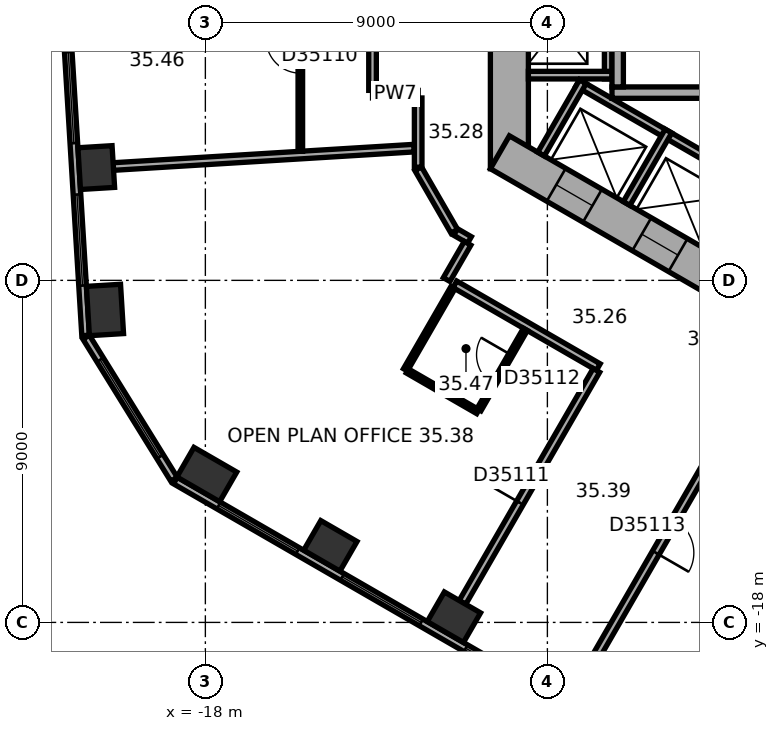
"""IFC4 building model, lengths in metres.
Left out: names, types, materials, properties, quantities, classifications, styles, units other than length and angle.
Written with IfcOpenShell. Run it as: python <this file> out.ifc"""

import sys

from ifc_helpers import new_model, si_unit, direction, frame, frame_2d, origin, origin_2d, place, context, subcontext, project, spatial, rectangle, extrude, element, fill, save


model = new_model("IFC4")
c1 = context("Model", 3, precision=1e-05, world=origin(), true_north=direction((0.0, 1.0)))
c2 = subcontext(c1, "Body", "Model", "MODEL_VIEW")
j1 = project(units=[si_unit("LENGTHUNIT", "METRE"), si_unit("PLANEANGLEUNIT", "RADIAN")], contexts=[c1])
p1 = place(None, origin())
s1 = spatial("IfcSite", under=j1, at=p1, CompositionType="ELEMENT")
p2 = place(p1, origin())
s2 = spatial("IfcBuilding", under=s1, at=p2, CompositionType="ELEMENT")
p3 = place(p2, frame((0.0, 0.0, 146.6)))
s3 = spatial("IfcBuildingStorey", under=s2, at=p3, CompositionType="ELEMENT", Elevation=146.6)
p4 = place(p3, frame((-20.871, -6.032, 0.0), z_axis=(0.0, 0.0, 1.0), x_axis=(0.061048539535, -0.998134798422, 0.0)))
e1 = element("IfcColumn", 1, at=p4, inside=s3, PredefinedType="COLUMN", context=c2, shape_type="SweptSolid", body=[
    extrude(rectangle(XDim=1.1, YDim=0.9, at=origin_2d()), origin(), (0.0, 0.0, 1.0), 3.7),
])
for number, where, z_axis, x_axis in (
    (2, (-20.642, -9.779, 0.0), (0.0, 0.0, 1.0), (0.061, -0.998, 0.0)),
    (3, (-17.962, -14.109, 0.0), (0.0, 0.0, 1.0), (0.866, -0.5, 0.0)),
):
    element("IfcColumn", number, at=place(p3, frame(where, z_axis=z_axis, x_axis=x_axis)), inside=s3, PredefinedType="COLUMN", context=c2, shape_type="SweptSolid", body=[
        extrude(rectangle(XDim=1.3, YDim=0.9, at=origin_2d()), origin(), (0.0, 0.0, 1.0), 3.7),
    ])
for number, where, z_axis, x_axis in (
    (4, (-14.711, -15.986, 0.0), (0.0, 0.0, 1.0), (0.866, -0.5, 0.0)),
    (5, (-11.46, -17.863, 0.0), (0.0, 0.0, 1.0), (0.866, -0.5, 0.0)),
):
    element("IfcColumn", number, at=place(p3, frame(where, z_axis=z_axis, x_axis=x_axis)), inside=s3, PredefinedType="COLUMN", context=c2, shape_type="SweptSolid", body=[
        extrude(rectangle(XDim=1.1, YDim=0.9, at=origin_2d()), origin(), (0.0, 0.0, 1.0), 3.7),
    ])
p5 = place(p3, frame((-10.0, 6.062, 0.0), z_axis=(0.0, 0.0, 1.0), x_axis=(0.0, -1.0, 0.0)))
e6 = element("IfcWall", 6, at=p5, inside=s3, PredefinedType="SHEAR", context=c2, shape_type="SweptSolid", body=[
    extrude(rectangle(XDim=12.125, YDim=1.0, at=frame_2d((6.062, 0.0))), origin(), (0.0, 0.0, 1.0), 3.7),
])
p6 = place(p5, frame((5.212, 0.0, 0.0)))
e7 = element("IfcOpeningElement", 7, at=p6, cuts=e6, PredefinedType="OPENING", context=c2, shape_type="SweptSolid", body=[
    extrude(rectangle(XDim=1.1, YDim=2.1, at=frame_2d((0.55, 1.05))), frame((0.0, 0.51, 0.0), z_axis=(0.0, -1.0, 0.0), x_axis=(1.0, 0.0, 0.0)), (0.0, 0.0, 1.0), 1.02),
])
p7 = place(p5, frame((7.812, 0.0, 0.0)))
e8 = element("IfcOpeningElement", 8, at=p7, cuts=e6, PredefinedType="OPENING", context=c2, shape_type="SweptSolid", body=[
    extrude(rectangle(XDim=1.1, YDim=2.1, at=frame_2d((0.55, 1.05))), frame((0.0, 0.51, 0.0), z_axis=(0.0, -1.0, 0.0), x_axis=(1.0, 0.0, 0.0)), (0.0, 0.0, 1.0), 1.02),
])
p8 = place(p3, frame((-10.25, -5.629, 0.0), z_axis=(0.0, 0.0, 1.0), x_axis=(0.866022616891, -0.50000482701, 0.0)))
e9 = element("IfcWall", 9, at=p8, inside=s3, PredefinedType="SHEAR", context=c2, shape_type="SweptSolid", body=[
    extrude(rectangle(XDim=12.125, YDim=1.0, at=frame_2d((6.062, 0.0))), origin(), (0.0, 0.0, 1.0), 3.7),
])
p9 = place(p8, frame((6.262, 0.0, 0.0)))
e10 = element("IfcOpeningElement", 10, at=p9, cuts=e9, PredefinedType="OPENING", context=c2, shape_type="SweptSolid", body=[
    extrude(rectangle(XDim=1.5, YDim=2.1, at=frame_2d((0.75, 1.05))), frame((0.0, 0.51, 0.0), z_axis=(0.0, -1.0, 0.0), x_axis=(1.0, 0.0, 0.0)), (0.0, 0.0, 1.0), 1.02),
])
p10 = place(p8, frame((1.712, 0.0, 0.0)))
e11 = element("IfcOpeningElement", 11, at=p10, cuts=e9, PredefinedType="OPENING", context=c2, shape_type="SweptSolid", body=[
    extrude(rectangle(XDim=1.1, YDim=2.1, at=frame_2d((0.55, 1.05))), frame((0.0, 0.51, 0.0), z_axis=(0.0, -1.0, 0.0), x_axis=(1.0, 0.0, 0.0)), (0.0, 0.0, 1.0), 1.02),
])
p11 = place(p8, frame((4.312, 0.0, 0.0)))
e12 = element("IfcOpeningElement", 12, at=p11, cuts=e9, PredefinedType="OPENING", context=c2, shape_type="SweptSolid", body=[
    extrude(rectangle(XDim=1.1, YDim=2.1, at=frame_2d((0.55, 1.05))), frame((0.0, 0.51, 0.0), z_axis=(0.0, -1.0, 0.0), x_axis=(1.0, 0.0, 0.0)), (0.0, 0.0, 1.0), 1.02),
])
p12 = place(p3, frame((-22.375, 9.557, 0.0), z_axis=(0.0, 0.0, 1.0), x_axis=(0.061036015339, -0.998135564356, 0.0)))
e13 = element("IfcWall", 13, at=p12, inside=s3, PredefinedType="STANDARD", context=c2, shape_type="SweptSolid", body=[
    extrude(rectangle(XDim=20.044, YDim=0.2, at=frame_2d((10.022, 0.0))), origin(), (0.0, 0.0, 1.0), 3.7),
])
p13 = place(p12, frame((1.313, 0.0, 0.9)))
e14 = element("IfcOpeningElement", 14, at=p13, cuts=e13, PredefinedType="OPENING", context=c2, shape_type="SweptSolid", body=[
    extrude(rectangle(XDim=2.4, YDim=2.0, at=frame_2d((1.2, 1.0))), frame((0.0, 0.11, 0.0), z_axis=(0.0, -1.0, 0.0), x_axis=(1.0, 0.0, 0.0)), (0.0, 0.0, 1.0), 0.22),
])
p14 = place(p12, frame((5.067, 0.0, 0.9)))
e15 = element("IfcOpeningElement", 15, at=p14, cuts=e13, PredefinedType="OPENING", context=c2, shape_type="SweptSolid", body=[
    extrude(rectangle(XDim=2.4, YDim=2.0, at=frame_2d((1.2, 1.0))), frame((0.0, 0.11, 0.0), z_axis=(0.0, -1.0, 0.0), x_axis=(1.0, 0.0, 0.0)), (0.0, 0.0, 1.0), 0.22),
])
p15 = place(p12, frame((8.821, 0.0, 0.9)))
e16 = element("IfcOpeningElement", 16, at=p15, cuts=e13, PredefinedType="OPENING", context=c2, shape_type="SweptSolid", body=[
    extrude(rectangle(XDim=2.4, YDim=2.0, at=frame_2d((1.2, 1.0))), frame((0.0, 0.11, 0.0), z_axis=(0.0, -1.0, 0.0), x_axis=(1.0, 0.0, 0.0)), (0.0, 0.0, 1.0), 0.22),
])
p16 = place(p12, frame((12.575, 0.0, 0.9)))
e17 = element("IfcOpeningElement", 17, at=p16, cuts=e13, PredefinedType="OPENING", context=c2, shape_type="SweptSolid", body=[
    extrude(rectangle(XDim=2.4, YDim=2.0, at=frame_2d((1.2, 1.0))), frame((0.0, 0.11, 0.0), z_axis=(0.0, -1.0, 0.0), x_axis=(1.0, 0.0, 0.0)), (0.0, 0.0, 1.0), 0.22),
])
p17 = place(p12, frame((16.329, 0.0, 0.9)))
e18 = element("IfcOpeningElement", 18, at=p17, cuts=e13, PredefinedType="OPENING", context=c2, shape_type="SweptSolid", body=[
    extrude(rectangle(XDim=2.4, YDim=2.0, at=frame_2d((1.2, 1.0))), frame((0.0, 0.11, 0.0), z_axis=(0.0, -1.0, 0.0), x_axis=(1.0, 0.0, 0.0)), (0.0, 0.0, 1.0), 0.22),
])
p18 = place(p3, frame((-21.137, -10.496, 0.0), z_axis=(0.0, 0.0, 1.0), x_axis=(0.526178661629, -0.850374044786, 0.0)))
e19 = element("IfcWall", 19, at=p18, inside=s3, PredefinedType="STANDARD", context=c2, shape_type="SweptSolid", body=[
    extrude(rectangle(XDim=4.395, YDim=0.2, at=frame_2d((2.197, 0.0))), origin(), (0.0, 0.0, 1.0), 3.7),
])
p19 = place(p18, frame((0.698, 0.0, 0.9)))
e20 = element("IfcOpeningElement", 20, at=p19, cuts=e19, PredefinedType="OPENING", context=c2, shape_type="SweptSolid", body=[
    extrude(rectangle(XDim=3.0, YDim=2.0, at=frame_2d((1.5, 1.0))), frame((0.0, 0.11, 0.0), z_axis=(0.0, -1.0, 0.0), x_axis=(1.0, 0.0, 0.0)), (0.0, 0.0, 1.0), 0.22),
])
p20 = place(p3, frame((-18.789, -14.267, 0.0), z_axis=(0.0, 0.0, 1.0), x_axis=(0.866023315909, -0.500003616288, 0.0)))
e21 = element("IfcWall", 21, at=p20, inside=s3, PredefinedType="STANDARD", context=c2, shape_type="SweptSolid", body=[
    extrude(rectangle(XDim=20.044, YDim=0.2, at=frame_2d((10.022, 0.0))), origin(), (0.0, 0.0, 1.0), 3.7),
])
p21 = place(p20, frame((1.314, 0.0, 0.9)))
e22 = element("IfcOpeningElement", 22, at=p21, cuts=e21, PredefinedType="OPENING", context=c2, shape_type="SweptSolid", body=[
    extrude(rectangle(XDim=2.4, YDim=2.0, at=frame_2d((1.2, 1.0))), frame((0.0, 0.11, 0.0), z_axis=(0.0, -1.0, 0.0), x_axis=(1.0, 0.0, 0.0)), (0.0, 0.0, 1.0), 0.22),
])
p22 = place(p20, frame((5.069, 0.0, 0.9)))
e23 = element("IfcOpeningElement", 23, at=p22, cuts=e21, PredefinedType="OPENING", context=c2, shape_type="SweptSolid", body=[
    extrude(rectangle(XDim=2.4, YDim=2.0, at=frame_2d((1.2, 1.0))), frame((0.0, 0.11, 0.0), z_axis=(0.0, -1.0, 0.0), x_axis=(1.0, 0.0, 0.0)), (0.0, 0.0, 1.0), 0.22),
])
p23 = place(p20, frame((8.823, 0.0, 0.9)))
e24 = element("IfcOpeningElement", 24, at=p23, cuts=e21, PredefinedType="OPENING", context=c2, shape_type="SweptSolid", body=[
    extrude(rectangle(XDim=2.4, YDim=2.0, at=frame_2d((1.2, 1.0))), frame((0.0, 0.11, 0.0), z_axis=(0.0, -1.0, 0.0), x_axis=(1.0, 0.0, 0.0)), (0.0, 0.0, 1.0), 0.22),
])
p24 = place(p20, frame((12.577, 0.0, 0.9)))
e25 = element("IfcOpeningElement", 25, at=p24, cuts=e21, PredefinedType="OPENING", context=c2, shape_type="SweptSolid", body=[
    extrude(rectangle(XDim=2.4, YDim=2.0, at=frame_2d((1.2, 1.0))), frame((0.0, 0.11, 0.0), z_axis=(0.0, -1.0, 0.0), x_axis=(1.0, 0.0, 0.0)), (0.0, 0.0, 1.0), 0.22),
])
p25 = place(p20, frame((16.331, 0.0, 0.9)))
e26 = element("IfcOpeningElement", 26, at=p25, cuts=e21, PredefinedType="OPENING", context=c2, shape_type="SweptSolid", body=[
    extrude(rectangle(XDim=2.4, YDim=2.0, at=frame_2d((1.2, 1.0))), frame((0.0, 0.11, 0.0), z_axis=(0.0, -1.0, 0.0), x_axis=(1.0, 0.0, 0.0)), (0.0, 0.0, 1.0), 0.22),
])
p26 = place(p3, frame((-7.4, 4.3, 0.0), z_axis=(0.0, 0.0, 1.0), x_axis=(0.0, -1.0, 0.0)))
e27 = element("IfcWall", 27, at=p26, inside=s3, PredefinedType="PARTITIONING", context=c2, shape_type="SweptSolid", body=[
    extrude(rectangle(XDim=8.0, YDim=0.2, at=frame_2d((4.0, 0.0))), origin(), (0.0, 0.0, 1.0), 3.42),
])
p27 = place(p3, frame((-7.3, -3.6, 0.0), z_axis=(0.0, 0.0, 1.0), x_axis=(-1.0, 0.0, 0.0)))
e28 = element("IfcWall", 28, at=p27, inside=s3, PredefinedType="PARTITIONING", context=c2, shape_type="SweptSolid", body=[
    extrude(rectangle(XDim=2.2, YDim=0.2, at=frame_2d((1.1, 0.0))), origin(), (0.0, 0.0, 1.0), 3.42),
])
p28 = place(p3, frame((-8.203, -3.809, 0.0), z_axis=(0.0, 0.0, 1.0), x_axis=(0.866028230842, -0.499995103361, 0.0)))
e29 = element("IfcWall", 29, at=p28, inside=s3, PredefinedType="PARTITIONING", context=c2, shape_type="SweptSolid", body=[
    extrude(rectangle(XDim=5.4, YDim=0.2, at=frame_2d((2.7, 0.0))), origin(), (0.0, 0.0, 1.0), 3.42),
])
for number, where, z_axis, x_axis in (
    (30, (-8.067, -3.772, 0.0), (0.0, 0.0, 1.0), (-0.5, -0.866, 0.0)),
    (31, (-5.815, -5.072, 0.0), (0.0, 0.0, 1.0), (-0.5, -0.866, 0.0)),
):
    element("IfcWall", number, at=place(p3, frame(where, z_axis=z_axis, x_axis=x_axis)), inside=s3, PredefinedType="PARTITIONING", context=c2, shape_type="SweptSolid", body=[
        extrude(rectangle(XDim=2.2, YDim=0.2, at=frame_2d((1.1, 0.0))), origin(), (0.0, 0.0, 1.0), 3.42),
    ])
p29 = place(p3, frame((-2.6, -4.06, 0.0), z_axis=(0.0, 0.0, 1.0), x_axis=(-1.0, 0.0, 0.0)))
e32 = element("IfcWall", 32, at=p29, inside=s3, PredefinedType="SHEAR", context=c2, shape_type="SweptSolid", body=[
    extrude(rectangle(XDim=4.7, YDim=0.3, at=frame_2d((2.35, 0.0))), origin(), (0.0, 0.0, 1.0), 3.42),
])
p30 = place(p3, frame((-7.15, 3.15, 0.0), z_axis=(0.0, 0.0, 1.0), x_axis=(0.0, -1.0, 0.0)))
e33 = element("IfcWall", 33, at=p30, inside=s3, PredefinedType="SHEAR", context=c2, shape_type="SweptSolid", body=[
    extrude(rectangle(XDim=7.06, YDim=0.3, at=frame_2d((3.53, 0.0))), origin(), (0.0, 0.0, 1.0), 3.42),
])
p31 = place(p3, frame((-20.421, -6.005, 0.0), z_axis=(0.0, 0.0, 1.0), x_axis=(0.998134865741, 0.061047438866, 0.0)))
e34 = element("IfcWall", 34, at=p31, inside=s3, PredefinedType="PARTITIONING", context=c2, shape_type="SweptSolid", body=[
    extrude(rectangle(XDim=7.927, YDim=0.2, at=frame_2d((3.963, 0.0))), origin(), (0.0, 0.0, 1.0), 2.87),
])
p32 = place(p3, frame((-15.501, 5.479, 0.0), z_axis=(0.0, 0.0, 1.0), x_axis=(0.0, -1.0, 0.0)))
e35 = element("IfcWall", 35, at=p32, inside=s3, PredefinedType="PARTITIONING", context=c2, shape_type="SweptSolid", body=[
    extrude(rectangle(XDim=11.083, YDim=0.12, at=frame_2d((5.542, 0.0))), origin(), (0.0, 0.0, 1.0), 3.42),
])
p33 = place(p32, frame((0.55, 0.0, 0.0)))
e36 = element("IfcOpeningElement", 36, at=p33, cuts=e35, PredefinedType="OPENING", context=c2, shape_type="SweptSolid", body=[
    extrude(rectangle(XDim=1.0, YDim=2.1, at=frame_2d((0.5, 1.05))), frame((0.0, 0.07, 0.0), z_axis=(0.0, -1.0, 0.0), x_axis=(1.0, 0.0, 0.0)), (0.0, 0.0, 1.0), 0.14),
])
p34 = place(p32, frame((3.636, 0.0, 0.0)))
e37 = element("IfcOpeningElement", 37, at=p34, cuts=e35, PredefinedType="OPENING", context=c2, shape_type="SweptSolid", body=[
    extrude(rectangle(XDim=0.9, YDim=2.1, at=frame_2d((0.45, 1.05))), frame((0.0, 0.07, 0.0), z_axis=(0.0, -1.0, 0.0), x_axis=(1.0, 0.0, 0.0)), (0.0, 0.0, 1.0), 0.14),
])
p35 = place(p32, frame((8.127, 0.0, 0.0)))
e38 = element("IfcOpeningElement", 38, at=p35, cuts=e35, PredefinedType="OPENING", context=c2, shape_type="SweptSolid", body=[
    extrude(rectangle(XDim=0.9, YDim=2.1, at=frame_2d((0.45, 1.05))), frame((0.0, 0.07, 0.0), z_axis=(0.0, -1.0, 0.0), x_axis=(1.0, 0.0, 0.0)), (0.0, 0.0, 1.0), 0.14),
])
p36 = place(p3, frame((-13.601, -4.101, 0.0), z_axis=(0.0, 0.0, 1.0), x_axis=(1.0, 0.0, 0.0)))
e39 = element("IfcWall", 39, at=p36, inside=s3, PredefinedType="PARTITIONING", context=c2, shape_type="SweptSolid", body=[
    extrude(rectangle(XDim=1.201, YDim=0.2, at=frame_2d((0.601, 0.0))), origin(), (0.0, 0.0, 1.0), 3.42),
])
p37 = place(p3, frame((-13.601, 2.101, 0.0), z_axis=(0.0, 0.0, 1.0), x_axis=(0.0, -1.0, 0.0)))
e40 = element("IfcWall", 40, at=p37, inside=s3, PredefinedType="PARTITIONING", context=c2, shape_type="SweptSolid", body=[
    extrude(rectangle(XDim=6.102, YDim=0.2, at=frame_2d((3.051, 0.0))), origin(), (0.0, 0.0, 1.0), 3.42),
])
p38 = place(p37, frame((2.551, 0.0, 0.0)))
e41 = element("IfcOpeningElement", 41, at=p38, cuts=e40, PredefinedType="OPENING", context=c2, shape_type="SweptSolid", body=[
    extrude(rectangle(XDim=1.0, YDim=2.1, at=frame_2d((0.5, 1.05))), frame((0.0, 0.11, 0.0), z_axis=(0.0, -1.0, 0.0), x_axis=(1.0, 0.0, 0.0)), (0.0, 0.0, 1.0), 0.22),
])
p39 = place(p3, frame((-12.735, -11.355, 0.0), z_axis=(0.0, 0.0, 1.0), x_axis=(0.500004234368, 0.866022959057, 0.0)))
e42 = element("IfcWall", 42, at=p39, inside=s3, PredefinedType="PARTITIONING", context=c2, shape_type="SweptSolid", body=[
    extrude(rectangle(XDim=2.5, YDim=0.12, at=frame_2d((1.25, 0.0))), origin(), (0.0, 0.0, 1.0), 3.42),
])
p40 = place(p3, frame((-12.4, -6.062, 0.0), z_axis=(0.0, 0.0, 1.0), x_axis=(0.500022797313, -0.86601224135, 0.0)))
e43 = element("IfcWall", 43, at=p40, inside=s3, PredefinedType="PARTITIONING", context=c2, shape_type="SweptSolid", body=[
    extrude(rectangle(XDim=1.9, YDim=0.2, at=frame_2d((0.95, 0.0))), origin(), (0.0, 0.0, 1.0), 3.42),
])
p41 = place(p3, frame((-12.4, -4.201, 0.0), z_axis=(0.0, 0.0, 1.0), x_axis=(0.0, -1.0, 0.0)))
e44 = element("IfcWall", 44, at=p41, inside=s3, PredefinedType="PARTITIONING", context=c2, shape_type="SweptSolid", body=[
    extrude(rectangle(XDim=1.821, YDim=0.2, at=frame_2d((0.911, 0.0))), origin(), (0.0, 0.0, 1.0), 3.42),
])
p42 = place(p3, frame((-11.435, -9.103, 0.0), z_axis=(0.0, 0.0, 1.0), x_axis=(0.866007399799, -0.500031182522, 0.0)))
e45 = element("IfcWall", 45, at=p42, inside=s3, PredefinedType="PARTITIONING", context=c2, shape_type="SweptSolid", body=[
    extrude(rectangle(XDim=4.358, YDim=0.2, at=frame_2d((2.179, 0.0))), origin(), (0.0, 0.0, 1.0), 3.42),
])
p43 = place(p3, frame((-11.415, -7.728, 0.0), z_axis=(0.0, 0.0, 1.0), x_axis=(0.865915281873, -0.500190688257, 0.0)))
e46 = element("IfcWall", 46, at=p43, inside=s3, PredefinedType="PARTITIONING", context=c2, shape_type="SweptSolid", body=[
    extrude(rectangle(XDim=0.421, YDim=0.2, at=frame_2d((0.21, 0.0))), origin(), (0.0, 0.0, 1.0), 3.42),
])
p44 = place(p3, frame((-11.235, -17.474, 0.0), z_axis=(0.0, 0.0, 1.0), x_axis=(0.500009260695, 0.866020057054, 0.0)))
e47 = element("IfcWall", 47, at=p44, inside=s3, PredefinedType="PARTITIONING", context=c2, shape_type="SweptSolid", body=[
    extrude(rectangle(XDim=7.049, YDim=0.2, at=frame_2d((3.524, 0.0))), origin(), (0.0, 0.0, 1.0), 2.87),
])
p45 = place(p44, frame((3.024, 0.0, 0.0)))
e48 = element("IfcOpeningElement", 48, at=p45, cuts=e47, PredefinedType="OPENING", context=c2, shape_type="SweptSolid", body=[
    extrude(rectangle(XDim=1.0, YDim=2.1, at=frame_2d((0.5, 1.05))), frame((0.0, 0.11, 0.0), z_axis=(0.0, -1.0, 0.0), x_axis=(1.0, 0.0, 0.0)), (0.0, 0.0, 1.0), 0.22),
])
p46 = place(p3, frame((-11.101, -8.025, 0.0), z_axis=(0.0, 0.0, 1.0), x_axis=(-0.500074377092, -0.865982457891, 0.0)))
e49 = element("IfcWall", 49, at=p46, inside=s3, PredefinedType="PARTITIONING", context=c2, shape_type="SweptSolid", body=[
    extrude(rectangle(XDim=1.101, YDim=0.2, at=frame_2d((0.55, 0.0))), origin(), (0.0, 0.0, 1.0), 3.42),
])
p47 = place(p3, frame((-10.829, -12.455, 0.0), z_axis=(0.0, 0.0, 1.0), x_axis=(-0.86600889856, 0.500028586798, 0.0)))
e50 = element("IfcWall", 50, at=p47, inside=s3, PredefinedType="PARTITIONING", context=c2, shape_type="SweptSolid", body=[
    extrude(rectangle(XDim=2.14, YDim=0.12, at=frame_2d((1.07, 0.0))), origin(), (0.0, 0.0, 1.0), 3.42),
])
p48 = place(p3, frame((-9.579, -10.29, 0.0), z_axis=(0.0, 0.0, 1.0), x_axis=(-0.499959183527, -0.866048967903, 0.0)))
e51 = element("IfcWall", 51, at=p48, inside=s3, PredefinedType="PARTITIONING", context=c2, shape_type="SweptSolid", body=[
    extrude(rectangle(XDim=2.44, YDim=0.12, at=frame_2d((1.22, 0.0))), origin(), (0.0, 0.0, 1.0), 3.42),
])
p49 = place(p48, frame((0.77, 0.0, 0.0)))
e52 = element("IfcOpeningElement", 52, at=p49, cuts=e51, PredefinedType="OPENING", context=c2, shape_type="SweptSolid", body=[
    extrude(rectangle(XDim=0.9, YDim=2.1, at=frame_2d((0.45, 1.05))), frame((0.0, 0.07, 0.0), z_axis=(0.0, -1.0, 0.0), x_axis=(1.0, 0.0, 0.0)), (0.0, 0.0, 1.0), 0.14),
])
p50 = place(p3, frame((-7.984, -19.351, 0.0), z_axis=(0.0, 0.0, 1.0), x_axis=(0.500010139422, 0.866019549707, 0.0)))
e53 = element("IfcWall", 53, at=p50, inside=s3, PredefinedType="PARTITIONING", context=c2, shape_type="SweptSolid", body=[
    extrude(rectangle(XDim=8.35, YDim=0.2, at=frame_2d((4.175, 0.0))), origin(), (0.0, 0.0, 1.0), 3.42),
])
p51 = place(p50, frame((3.675, 0.0, 0.0)))
e54 = element("IfcOpeningElement", 54, at=p51, cuts=e53, PredefinedType="OPENING", context=c2, shape_type="SweptSolid", body=[
    extrude(rectangle(XDim=1.0, YDim=2.1, at=frame_2d((0.5, 1.05))), frame((0.0, 0.11, 0.0), z_axis=(0.0, -1.0, 0.0), x_axis=(1.0, 0.0, 0.0)), (0.0, 0.0, 1.0), 0.22),
])
p52 = place(p16, origin())
e55 = element("IfcWindow", 55, at=p52, inside=s3, PartitioningType="SINGLE_PANEL", PredefinedType="WINDOW", context=c2, shape_type="SweptSolid", body=[
    extrude(rectangle(XDim=2.4, YDim=2.0, at=frame_2d((1.2, 1.0))), frame((0.0, 0.03, 0.0), z_axis=(0.0, -1.0, 0.0), x_axis=(1.0, 0.0, 0.0)), (0.0, 0.0, 1.0), 0.06),
])
fill(e17, e55)
p53 = place(p17, origin())
e56 = element("IfcWindow", 56, at=p53, inside=s3, PartitioningType="SINGLE_PANEL", PredefinedType="WINDOW", context=c2, shape_type="SweptSolid", body=[
    extrude(rectangle(XDim=2.4, YDim=2.0, at=frame_2d((1.2, 1.0))), frame((0.0, 0.03, 0.0), z_axis=(0.0, -1.0, 0.0), x_axis=(1.0, 0.0, 0.0)), (0.0, 0.0, 1.0), 0.06),
])
fill(e18, e56)
p54 = place(p19, origin())
e57 = element("IfcWindow", 57, at=p54, inside=s3, PartitioningType="SINGLE_PANEL", PredefinedType="WINDOW", context=c2, shape_type="SweptSolid", body=[
    extrude(rectangle(XDim=3.0, YDim=2.0, at=frame_2d((1.5, 1.0))), frame((0.0, 0.03, 0.0), z_axis=(0.0, -1.0, 0.0), x_axis=(1.0, 0.0, 0.0)), (0.0, 0.0, 1.0), 0.06),
])
fill(e20, e57)
p55 = place(p21, origin())
e58 = element("IfcWindow", 58, at=p55, inside=s3, PartitioningType="SINGLE_PANEL", PredefinedType="WINDOW", context=c2, shape_type="SweptSolid", body=[
    extrude(rectangle(XDim=2.4, YDim=2.0, at=frame_2d((1.2, 1.0))), frame((0.0, 0.03, 0.0), z_axis=(0.0, -1.0, 0.0), x_axis=(1.0, 0.0, 0.0)), (0.0, 0.0, 1.0), 0.06),
])
fill(e22, e58)
p56 = place(p22, origin())
e59 = element("IfcWindow", 59, at=p56, inside=s3, PartitioningType="SINGLE_PANEL", PredefinedType="WINDOW", context=c2, shape_type="SweptSolid", body=[
    extrude(rectangle(XDim=2.4, YDim=2.0, at=frame_2d((1.2, 1.0))), frame((0.0, 0.03, 0.0), z_axis=(0.0, -1.0, 0.0), x_axis=(1.0, 0.0, 0.0)), (0.0, 0.0, 1.0), 0.06),
])
fill(e23, e59)
p57 = place(p23, origin())
e60 = element("IfcWindow", 60, at=p57, inside=s3, PartitioningType="SINGLE_PANEL", PredefinedType="WINDOW", context=c2, shape_type="SweptSolid", body=[
    extrude(rectangle(XDim=2.4, YDim=2.0, at=frame_2d((1.2, 1.0))), frame((0.0, 0.03, 0.0), z_axis=(0.0, -1.0, 0.0), x_axis=(1.0, 0.0, 0.0)), (0.0, 0.0, 1.0), 0.06),
])
fill(e24, e60)
p58 = place(p10, origin())
e61 = element("IfcDoor", 61, at=p58, inside=s3, OperationType="DOUBLE_DOOR_SLIDING", PredefinedType="DOOR", context=c2, shape_type="SweptSolid", body=[
    extrude(rectangle(XDim=1.1, YDim=2.1, at=frame_2d((0.55, 1.05))), frame((0.0, 0.025, 0.0), z_axis=(0.0, -1.0, 0.0), x_axis=(1.0, 0.0, 0.0)), (0.0, 0.0, 1.0), 0.05),
])
fill(e11, e61)
p59 = place(p11, origin())
e62 = element("IfcDoor", 62, at=p59, inside=s3, OperationType="DOUBLE_DOOR_SLIDING", PredefinedType="DOOR", context=c2, shape_type="SweptSolid", body=[
    extrude(rectangle(XDim=1.1, YDim=2.1, at=frame_2d((0.55, 1.05))), frame((0.0, 0.025, 0.0), z_axis=(0.0, -1.0, 0.0), x_axis=(1.0, 0.0, 0.0)), (0.0, 0.0, 1.0), 0.05),
])
fill(e12, e62)
p60 = place(p35, origin())
e63 = element("IfcDoor", 63, at=p60, inside=s3, OperationType="SINGLE_SWING_LEFT", PredefinedType="DOOR", context=c2, shape_type="SweptSolid", body=[
    extrude(rectangle(XDim=0.9, YDim=2.1, at=frame_2d((0.45, 1.05))), frame((0.0, 0.025, 0.0), z_axis=(0.0, -1.0, 0.0), x_axis=(1.0, 0.0, 0.0)), (0.0, 0.0, 1.0), 0.05),
])
fill(e38, e63)
p61 = place(p45, origin())
e64 = element("IfcDoor", 64, at=p61, inside=s3, OperationType="SINGLE_SWING_LEFT", PredefinedType="DOOR", context=c2, shape_type="SweptSolid", body=[
    extrude(rectangle(XDim=1.0, YDim=2.1, at=frame_2d((0.5, 1.05))), frame((0.0, 0.025, 0.0), z_axis=(0.0, -1.0, 0.0), x_axis=(1.0, 0.0, 0.0)), (0.0, 0.0, 1.0), 0.05),
])
fill(e48, e64)
p62 = place(p49, origin())
e65 = element("IfcDoor", 65, at=p62, inside=s3, OperationType="SINGLE_SWING_LEFT", PredefinedType="DOOR", context=c2, shape_type="SweptSolid", body=[
    extrude(rectangle(XDim=0.9, YDim=2.1, at=frame_2d((0.45, 1.05))), frame((0.0, 0.025, 0.0), z_axis=(0.0, -1.0, 0.0), x_axis=(1.0, 0.0, 0.0)), (0.0, 0.0, 1.0), 0.05),
])
fill(e52, e65)
p63 = place(p51, origin())
e66 = element("IfcDoor", 66, at=p63, inside=s3, OperationType="SINGLE_SWING_LEFT", PredefinedType="DOOR", context=c2, shape_type="SweptSolid", body=[
    extrude(rectangle(XDim=1.0, YDim=2.1, at=frame_2d((0.5, 1.05))), frame((0.0, 0.025, 0.0), z_axis=(0.0, -1.0, 0.0), x_axis=(1.0, 0.0, 0.0)), (0.0, 0.0, 1.0), 0.05),
])
fill(e54, e66)
save(model, sys.argv[1])
